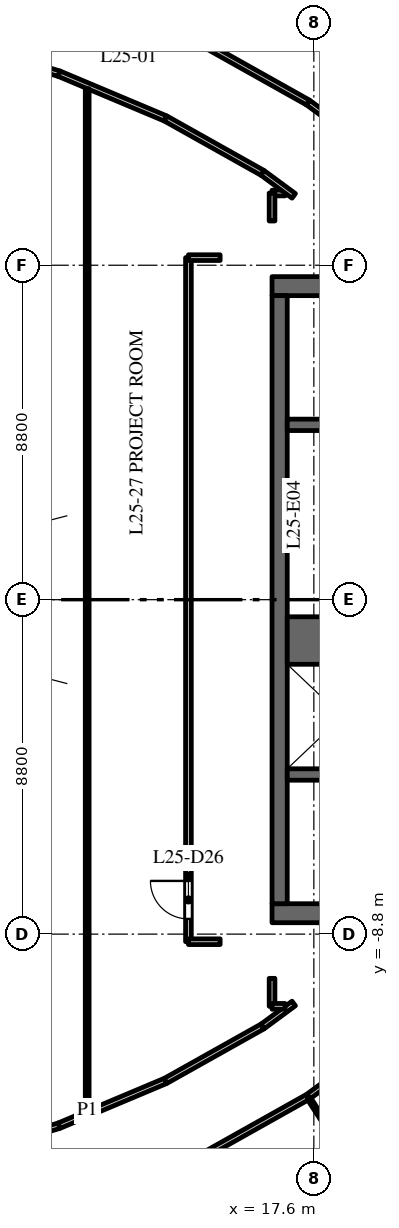
"""IFC4 building model, lengths in metres.
Left out: names, types, materials, properties, quantities, classifications, styles, units other than length and angle.
Written with IfcOpenShell. Run it as: python <this file> out.ifc"""

import sys

from ifc_helpers import new_model, si_unit, direction, frame, frame_2d, origin, place, context, subcontext, project, spatial, rectangle, extrude, element, fill, save


model = new_model("IFC4")
c1 = context("Model", 3, precision=1e-05, world=origin(), true_north=direction((0.0, 1.0)))
c2 = subcontext(c1, "Body", "Model", "MODEL_VIEW")
j1 = project(units=[si_unit("LENGTHUNIT", "METRE"), si_unit("PLANEANGLEUNIT", "RADIAN")], contexts=[c1])
p1 = place(None, origin())
s1 = spatial("IfcSite", under=j1, at=p1, CompositionType="ELEMENT")
p2 = place(p1, origin())
s2 = spatial("IfcBuilding", under=s1, at=p2, CompositionType="ELEMENT")
p3 = place(p2, frame((0.0, 0.0, 112.0)))
s3 = spatial("IfcBuildingStorey", under=s2, at=p3, CompositionType="ELEMENT", Elevation=112.0)
p4 = place(p3, frame((16.5, 8.25, 0.0), z_axis=(0.0, 0.0, 1.0), x_axis=(1.0, 0.0, 0.0)))
e1 = element("IfcWall", 1, at=p4, inside=s3, PredefinedType="SHEAR", context=c2, shape_type="SweptSolid", body=[
    extrude(rectangle(XDim=15.0, YDim=0.5, at=frame_2d((7.5, 0.0))), origin(), (0.0, 0.0, 1.0), 3.7),
])
p5 = place(p4, frame((6.9, 0.0, 0.0)))
e2 = element("IfcOpeningElement", 2, at=p5, cuts=e1, PredefinedType="OPENING", context=c2, shape_type="SweptSolid", body=[
    extrude(rectangle(XDim=1.2, YDim=2.1, at=frame_2d((0.6, 1.05))), frame((0.0, 0.26, 0.0), z_axis=(0.0, -1.0, 0.0), x_axis=(1.0, 0.0, 0.0)), (0.0, 0.0, 1.0), 0.52),
])
p6 = place(p4, frame((12.05, 0.0, 0.0)))
e3 = element("IfcOpeningElement", 3, at=p6, cuts=e1, PredefinedType="OPENING", context=c2, shape_type="SweptSolid", body=[
    extrude(rectangle(XDim=0.9, YDim=2.1, at=frame_2d((0.45, 1.05))), frame((0.0, 0.26, 0.0), z_axis=(0.0, -1.0, 0.0), x_axis=(1.0, 0.0, 0.0)), (0.0, 0.0, 1.0), 0.52),
])
p7 = place(p3, frame((16.5, -8.25, 0.0), z_axis=(0.0, 0.0, 1.0), x_axis=(1.0, 0.0, 0.0)))
e4 = element("IfcWall", 4, at=p7, inside=s3, PredefinedType="SHEAR", context=c2, shape_type="SweptSolid", body=[
    extrude(rectangle(XDim=15.0, YDim=0.5, at=frame_2d((7.5, 0.0))), origin(), (0.0, 0.0, 1.0), 3.7),
])
p8 = place(p7, frame((6.9, 0.0, 0.0)))
e5 = element("IfcOpeningElement", 5, at=p8, cuts=e4, PredefinedType="OPENING", context=c2, shape_type="SweptSolid", body=[
    extrude(rectangle(XDim=1.2, YDim=2.1, at=frame_2d((0.6, 1.05))), frame((0.0, 0.26, 0.0), z_axis=(0.0, -1.0, 0.0), x_axis=(1.0, 0.0, 0.0)), (0.0, 0.0, 1.0), 0.52),
])
p9 = place(p7, frame((12.425, 0.0, 0.0)))
e6 = element("IfcOpeningElement", 6, at=p9, cuts=e4, PredefinedType="OPENING", context=c2, shape_type="SweptSolid", body=[
    extrude(rectangle(XDim=0.9, YDim=2.1, at=frame_2d((0.45, 1.05))), frame((0.0, 0.26, 0.0), z_axis=(0.0, -1.0, 0.0), x_axis=(1.0, 0.0, 0.0)), (0.0, 0.0, 1.0), 0.52),
])
p10 = place(p3, frame((16.7, -8.0, 0.0), z_axis=(0.0, 0.0, 1.0), x_axis=(0.0, 1.0, 0.0)))
e7 = element("IfcWall", 7, at=p10, inside=s3, PredefinedType="SHEAR", context=c2, shape_type="SweptSolid", body=[
    extrude(rectangle(XDim=16.0, YDim=0.4, at=frame_2d((8.0, 0.0))), origin(), (0.0, 0.0, 1.0), 3.7),
])
p11 = place(p3, frame((16.9, -1.075, 0.0), z_axis=(0.0, 0.0, 1.0), x_axis=(1.0, 0.0, 0.0)))
e8 = element("IfcWall", 8, at=p11, inside=s3, PredefinedType="SHEAR", context=c2, shape_type="SweptSolid", body=[
    extrude(rectangle(XDim=2.9, YDim=1.25, at=frame_2d((1.45, 0.0))), origin(), (0.0, 0.0, 1.0), 3.7),
])
p12 = place(p3, frame((16.9, 4.6, 0.0), z_axis=(0.0, 0.0, 1.0), x_axis=(1.0, 0.0, 0.0)))
e9 = element("IfcWall", 9, at=p12, inside=s3, PredefinedType="SHEAR", context=c2, shape_type="SweptSolid", body=[
    extrude(rectangle(XDim=6.18, YDim=0.3, at=frame_2d((3.09, 0.0))), origin(), (0.0, 0.0, 1.0), 3.7),
])
p13 = place(p12, frame((4.9, 0.0, 0.0)))
e10 = element("IfcOpeningElement", 10, at=p13, cuts=e9, PredefinedType="OPENING", context=c2, shape_type="SweptSolid", body=[
    extrude(rectangle(XDim=1.1, YDim=2.1, at=frame_2d((0.55, 1.05))), frame((0.0, 0.16, 0.0), z_axis=(0.0, -1.0, 0.0), x_axis=(1.0, 0.0, 0.0)), (0.0, 0.0, 1.0), 0.32),
])
p14 = place(p3, frame((16.9, -4.6, 0.0), z_axis=(0.0, 0.0, 1.0), x_axis=(1.0, 0.0, 0.0)))
e11 = element("IfcWall", 11, at=p14, inside=s3, PredefinedType="SHEAR", context=c2, shape_type="SweptSolid", body=[
    extrude(rectangle(XDim=6.18, YDim=0.3, at=frame_2d((3.09, 0.0))), origin(), (0.0, 0.0, 1.0), 3.7),
])
p15 = place(p14, frame((4.9, 0.0, 0.0)))
e12 = element("IfcOpeningElement", 12, at=p15, cuts=e11, PredefinedType="OPENING", context=c2, shape_type="SweptSolid", body=[
    extrude(rectangle(XDim=1.1, YDim=2.1, at=frame_2d((0.55, 1.05))), frame((0.0, 0.16, 0.0), z_axis=(0.0, -1.0, 0.0), x_axis=(1.0, 0.0, 0.0)), (0.0, 0.0, 1.0), 0.32),
])
p16 = place(p3, frame((7.912, -14.738, 0.0), z_axis=(0.0, 0.0, 1.0), x_axis=(0.957606118849, 0.28808075455, 0.0)))
e13 = element("IfcWall", 13, at=p16, inside=s3, PredefinedType="PARTITIONING", context=c2, shape_type="SweptSolid", body=[
    extrude(rectangle(XDim=3.117, YDim=0.15, at=frame_2d((1.559, 0.0))), origin(), (0.0, 0.0, 1.0), 2.85),
])
p17 = place(p3, frame((7.912, 14.738, 0.0), z_axis=(0.0, 0.0, 1.0), x_axis=(0.957606118849, -0.28808075455, 0.0)))
e14 = element("IfcWall", 14, at=p17, inside=s3, PredefinedType="PARTITIONING", context=c2, shape_type="SweptSolid", body=[
    extrude(rectangle(XDim=3.117, YDim=0.15, at=frame_2d((1.559, 0.0))), origin(), (0.0, 0.0, 1.0), 2.85),
])
p18 = place(p17, frame((0.65, 0.0, 0.0)))
e15 = element("IfcOpeningElement", 15, at=p18, cuts=e14, PredefinedType="OPENING", context=c2, shape_type="SweptSolid", body=[
    extrude(rectangle(XDim=1.0, YDim=2.1, at=frame_2d((0.5, 1.05))), frame((0.0, 0.085, 0.0), z_axis=(0.0, -1.0, 0.0), x_axis=(1.0, 0.0, 0.0)), (0.0, 0.0, 1.0), 0.17),
])
for number, where, z_axis, x_axis in (
    (16, (10.897, -13.84, 0.0), (0.0, 0.0, 1.0), (0.922, 0.388, 0.0)),
    (17, (10.897, 13.84, 0.0), (0.0, 0.0, 1.0), (0.922, -0.388, 0.0)),
):
    element("IfcWall", number, at=place(p3, frame(where, z_axis=z_axis, x_axis=x_axis)), inside=s3, PredefinedType="PARTITIONING", context=c2, shape_type="SweptSolid", body=[
        extrude(rectangle(XDim=3.038, YDim=0.15, at=frame_2d((1.519, 0.0))), origin(), (0.0, 0.0, 1.0), 3.7),
    ])
p19 = place(p3, frame((11.636, -13.444, 0.0), z_axis=(0.0, 0.0, 1.0), x_axis=(0.0, 1.0, 0.0)))
e18 = element("IfcWall", 18, at=p19, inside=s3, PredefinedType="PARTITIONING", context=c2, shape_type="SweptSolid", body=[
    extrude(rectangle(XDim=26.888, YDim=0.1, at=frame_2d((13.444, 0.0))), origin(), (0.0, 0.0, 1.0), 2.75),
])
for number, where, z_axis, x_axis in (
    (19, (13.697, -12.662, 0.0), (0.0, 0.0, 1.0), (0.872, 0.489, 0.0)),
    (20, (13.697, 12.662, 0.0), (0.0, 0.0, 1.0), (0.872, -0.489, 0.0)),
):
    element("IfcWall", number, at=place(p3, frame(where, z_axis=z_axis, x_axis=x_axis)), inside=s3, PredefinedType="PARTITIONING", context=c2, shape_type="SweptSolid", body=[
        extrude(rectangle(XDim=2.927, YDim=0.15, at=frame_2d((1.464, 0.0))), origin(), (0.0, 0.0, 1.0), 3.7),
    ])
p20 = place(p3, frame((14.3, -9.0, 0.0), z_axis=(0.0, 0.0, 1.0), x_axis=(0.0, 1.0, 0.0)))
e21 = element("IfcWall", 21, at=p20, inside=s3, PredefinedType="PARTITIONING", context=c2, shape_type="SweptSolid", body=[
    extrude(rectangle(XDim=18.0, YDim=0.15, at=frame_2d((9.0, 0.0))), origin(), (0.0, 0.0, 1.0), 2.75),
])
p21 = place(p20, frame((0.6, 0.0, 0.0)))
e22 = element("IfcOpeningElement", 22, at=p21, cuts=e21, PredefinedType="OPENING", context=c2, shape_type="SweptSolid", body=[
    extrude(rectangle(XDim=1.0, YDim=2.1, at=frame_2d((0.5, 1.05))), frame((0.0, 0.085, 0.0), z_axis=(0.0, -1.0, 0.0), x_axis=(1.0, 0.0, 0.0)), (0.0, 0.0, 1.0), 0.17),
])
for number, where, z_axis, x_axis in (
    (23, (14.3, -9.0, 0.0), (0.0, 0.0, 1.0), (1.0, 0.0, 0.0)),
    (24, (14.3, 9.0, 0.0), (0.0, 0.0, 1.0), (1.0, 0.0, 0.0)),
):
    element("IfcWall", number, at=place(p3, frame(where, z_axis=z_axis, x_axis=x_axis)), inside=s3, PredefinedType="PARTITIONING", context=c2, shape_type="SweptSolid", body=[
        extrude(rectangle(XDim=0.834, YDim=0.15, at=frame_2d((0.417, 0.0))), origin(), (0.0, 0.0, 1.0), 3.7),
    ])
p22 = place(p3, frame((14.665, -14.642, 0.0), z_axis=(0.0, 0.0, 1.0), x_axis=(0.871997056828, 0.4895111162, 0.0)))
e25 = element("IfcWall", 25, at=p22, inside=s3, PredefinedType="PARTITIONING", context=c2, shape_type="SweptSolid", body=[
    extrude(rectangle(XDim=3.168, YDim=0.15, at=frame_2d((1.584, 0.0))), origin(), (0.0, 0.0, 1.0), 3.7),
])
p23 = place(p3, frame((14.682, 14.632, 0.0), z_axis=(0.0, 0.0, 1.0), x_axis=(0.872147050911, -0.489243826315, 0.0)))
e26 = element("IfcWall", 26, at=p23, inside=s3, PredefinedType="PARTITIONING", context=c2, shape_type="SweptSolid", body=[
    extrude(rectangle(XDim=3.168, YDim=0.15, at=frame_2d((1.584, 0.0))), origin(), (0.0, 0.0, 1.0), 3.7),
])
for number, where, z_axis, x_axis in (
    (27, (16.25, -11.23, 0.0), (0.0, 0.0, 1.0), (0.805, 0.593, 0.0)),
    (28, (16.25, 11.23, 0.0), (0.0, 0.0, 1.0), (0.805, -0.593, 0.0)),
):
    element("IfcWall", number, at=place(p3, frame(where, z_axis=z_axis, x_axis=x_axis)), inside=s3, PredefinedType="PARTITIONING", context=c2, shape_type="SweptSolid", body=[
        extrude(rectangle(XDim=1.02, YDim=0.15, at=frame_2d((0.51, 0.0))), origin(), (0.0, 0.0, 1.0), 3.7),
    ])
p24 = place(p3, frame((16.5, -10.7, 0.0), z_axis=(0.0, 0.0, 1.0), x_axis=(0.0, 1.0, 0.0)))
e29 = element("IfcWall", 29, at=p24, inside=s3, PredefinedType="PARTITIONING", context=c2, shape_type="SweptSolid", body=[
    extrude(rectangle(XDim=0.736, YDim=0.15, at=frame_2d((0.368, 0.0))), origin(), (0.0, 0.0, 1.0), 3.7),
])
p25 = place(p3, frame((16.5, -10.7, 0.0), z_axis=(0.0, 0.0, 1.0), x_axis=(1.0, 0.0, 0.0)))
e30 = element("IfcWall", 30, at=p25, inside=s3, PredefinedType="PARTITIONING", context=c2, shape_type="SweptSolid", body=[
    extrude(rectangle(XDim=0.343, YDim=0.15, at=frame_2d((0.171, 0.0))), origin(), (0.0, 0.0, 1.0), 3.7),
])
p26 = place(p3, frame((16.5, 9.964, 0.0), z_axis=(0.0, 0.0, 1.0), x_axis=(0.0, 1.0, 0.0)))
e31 = element("IfcWall", 31, at=p26, inside=s3, PredefinedType="PARTITIONING", context=c2, shape_type="SweptSolid", body=[
    extrude(rectangle(XDim=0.736, YDim=0.15, at=frame_2d((0.368, 0.0))), origin(), (0.0, 0.0, 1.0), 3.7),
])
p27 = place(p3, frame((16.5, 10.7, 0.0), z_axis=(0.0, 0.0, 1.0), x_axis=(1.0, 0.0, 0.0)))
e32 = element("IfcWall", 32, at=p27, inside=s3, PredefinedType="PARTITIONING", context=c2, shape_type="SweptSolid", body=[
    extrude(rectangle(XDim=0.343, YDim=0.15, at=frame_2d((0.171, 0.0))), origin(), (0.0, 0.0, 1.0), 3.7),
])
p28 = place(p3, frame((17.445, 13.082, 0.0), z_axis=(0.0, 0.0, 1.0), x_axis=(0.805185638843, -0.593022838516, 0.0)))
e33 = element("IfcWall", 33, at=p28, inside=s3, PredefinedType="PARTITIONING", context=c2, shape_type="SweptSolid", body=[
    extrude(rectangle(XDim=3.073, YDim=0.15, at=frame_2d((1.536, 0.0))), origin(), (0.0, 0.0, 1.0), 3.7),
])
p29 = place(p3, frame((17.447, -13.085, 0.0), z_axis=(0.0, 0.0, 1.0), x_axis=(0.542325736183, -0.840168314015, 0.0)))
e34 = element("IfcWall", 34, at=p29, inside=s3, PredefinedType="PARTITIONING", context=c2, shape_type="SweptSolid", body=[
    extrude(rectangle(XDim=10.066, YDim=0.1, at=frame_2d((5.033, 0.0))), origin(), (0.0, 0.0, 1.0), 3.7),
])
p30 = place(p3, frame((17.461, -13.07, 0.0), z_axis=(0.0, 0.0, 1.0), x_axis=(0.805228684186, 0.592964388613, 0.0)))
e35 = element("IfcWall", 35, at=p30, inside=s3, PredefinedType="PARTITIONING", context=c2, shape_type="SweptSolid", body=[
    extrude(rectangle(XDim=3.052, YDim=0.15, at=frame_2d((1.526, 0.0))), origin(), (0.0, 0.0, 1.0), 3.7),
])
p31 = place(p21, origin())
e36 = element("IfcDoor", 36, at=p31, inside=s3, OperationType="SINGLE_SWING_RIGHT", PredefinedType="DOOR", context=c2, shape_type="SweptSolid", body=[
    extrude(rectangle(XDim=1.0, YDim=2.1, at=frame_2d((0.5, 1.05))), frame((0.0, 0.025, 0.0), z_axis=(0.0, -1.0, 0.0), x_axis=(1.0, 0.0, 0.0)), (0.0, 0.0, 1.0), 0.05),
])
fill(e22, e36)
save(model, sys.argv[1])
